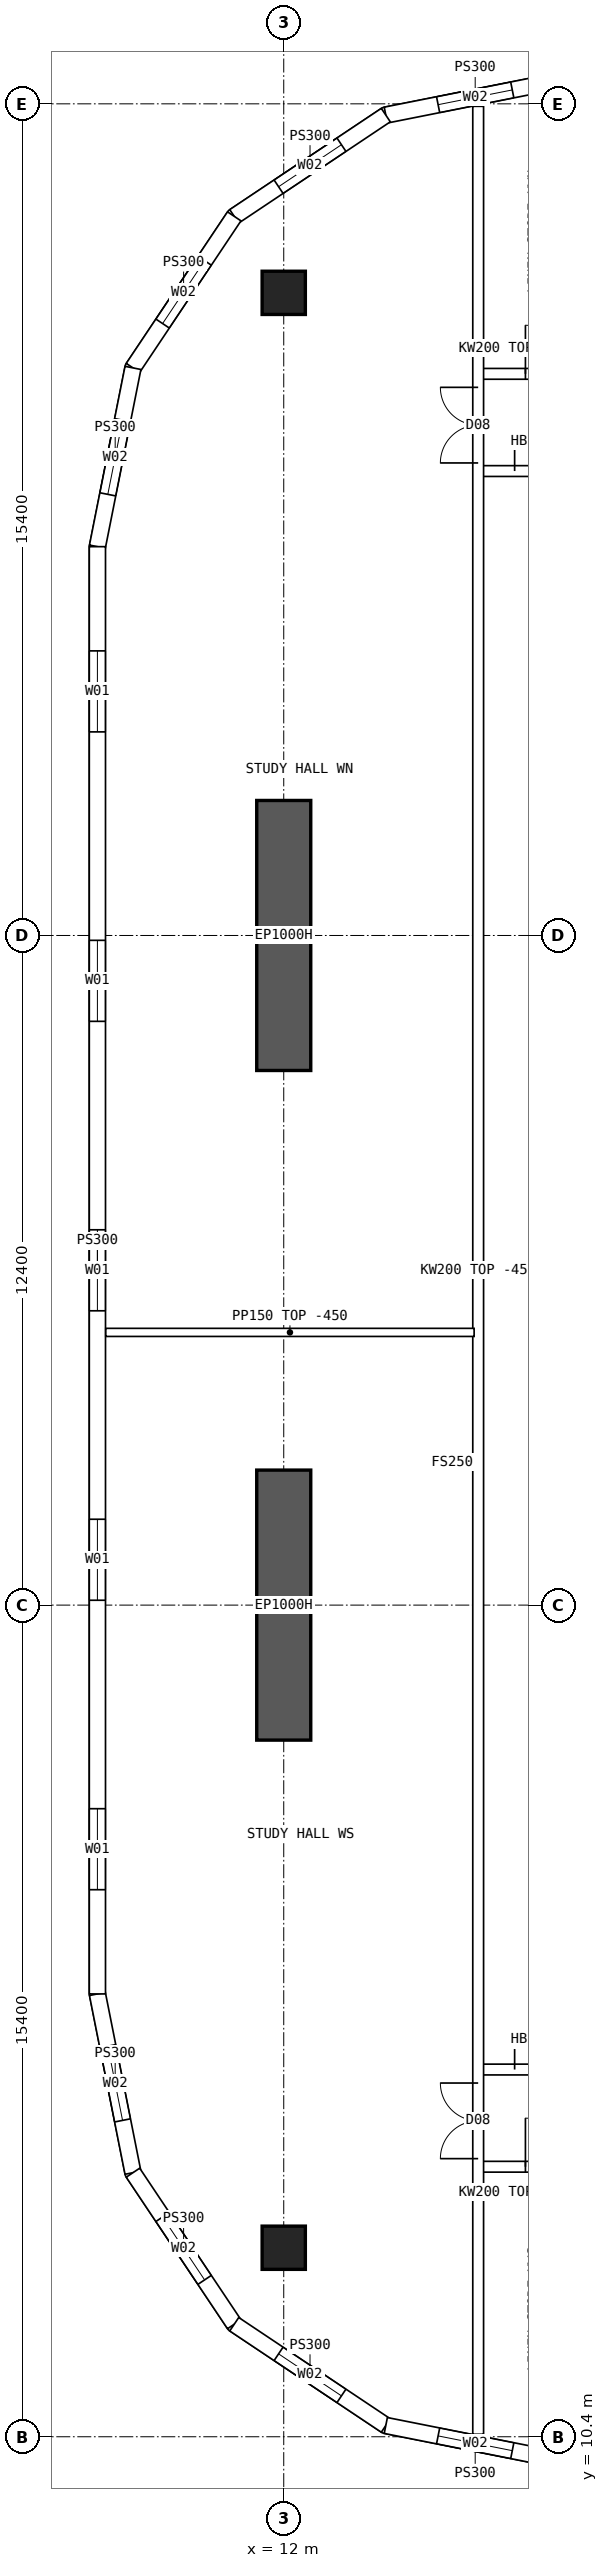
"""IFC4 building model, lengths in metres.
Left out: names, types, materials, properties, quantities, classifications, styles, units other than length and angle.
Written with IfcOpenShell. Run it as: python <this file> out.ifc"""

import sys

from ifc_helpers import new_model, si_unit, direction, frame, frame_2d, origin, origin_2d, place, context, subcontext, project, spatial, polyline, rectangle, hollow_rectangle, outline, extrude, element, fill, save


model = new_model("IFC4")
c1 = context("Model", 3, precision=1e-05, world=origin(), true_north=direction((0.0, 1.0)))
c2 = subcontext(c1, "Body", "Model", "MODEL_VIEW")
j1 = project(units=[si_unit("LENGTHUNIT", "METRE"), si_unit("PLANEANGLEUNIT", "RADIAN")], contexts=[c1])
p1 = place(None, origin())
s1 = spatial("IfcSite", under=j1, at=p1, CompositionType="ELEMENT")
p2 = place(p1, origin())
s2 = spatial("IfcBuilding", under=s1, at=p2, CompositionType="ELEMENT")
p3 = place(p2, frame((0.0, 0.0, 144.85)))
s3 = spatial("IfcBuildingStorey", under=s2, at=p3, CompositionType="ELEMENT", Elevation=144.85)
for number, where, z_axis, x_axis in (
    (1, (12.0, 13.9, 0.0), (0.0, 0.0, 1.0), (1.0, 0.0, 0.0)),
    (2, (12.0, 50.1, 0.0), (0.0, 0.0, 1.0), (1.0, 0.0, 0.0)),
):
    element("IfcColumn", number, at=place(p3, frame(where, z_axis=z_axis, x_axis=x_axis)), inside=s3, PredefinedType="COLUMN", context=c2, shape_type="SweptSolid", body=[
        extrude(hollow_rectangle(XDim=0.8, YDim=0.8, WallThickness=0.08, at=origin_2d()), origin(), (0.0, 0.0, 1.0), 3.75),
    ])
for number, where, z_axis, x_axis in (
    (3, (12.0, 23.3, 0.0), (0.0, 0.0, 1.0), (0.0, 1.0, 0.0)),
    (4, (12.0, 35.7, 0.0), (0.0, 0.0, 1.0), (0.0, 1.0, 0.0)),
):
    element("IfcWall", number, at=place(p3, frame(where, z_axis=z_axis, x_axis=x_axis)), inside=s3, PredefinedType="SHEAR", context=c2, shape_type="SweptSolid", body=[
        extrude(rectangle(XDim=5.0, YDim=1.0, at=frame_2d((2.5, 0.0))), origin(), (0.0, 0.0, 1.0), 3.75),
    ])
p4 = place(p3, frame((8.55, 45.4, 0.0), z_axis=(0.0, 0.0, 1.0), x_axis=(0.0, -1.0, 0.0)))
e5 = element("IfcWall", 5, at=p4, inside=s3, PredefinedType="SOLIDWALL", context=c2, shape_type="SweptSolid", body=[
    extrude(outline(polyline([(-0.015, -0.15), (26.815, -0.15), (26.785, 0.15), (0.015, 0.15), (-0.015, -0.15)])), origin(), (0.0, 0.0, 1.0), 3.3),
])
p5 = place(p4, frame((1.93, 0.0, 0.9)))
e6 = element("IfcOpeningElement", 6, at=p5, cuts=e5, PredefinedType="OPENING", context=c2, shape_type="SweptSolid", body=[
    extrude(rectangle(XDim=1.5, YDim=2.0, at=frame_2d((0.75, 1.0))), frame((0.0, 0.16, 0.0), z_axis=(0.0, -1.0, 0.0), x_axis=(1.0, 0.0, 0.0)), (0.0, 0.0, 1.0), 0.32),
])
p6 = place(p4, frame((7.29, 0.0, 0.9)))
e7 = element("IfcOpeningElement", 7, at=p6, cuts=e5, PredefinedType="OPENING", context=c2, shape_type="SweptSolid", body=[
    extrude(rectangle(XDim=1.5, YDim=2.0, at=frame_2d((0.75, 1.0))), frame((0.0, 0.16, 0.0), z_axis=(0.0, -1.0, 0.0), x_axis=(1.0, 0.0, 0.0)), (0.0, 0.0, 1.0), 0.32),
])
p7 = place(p4, frame((12.65, 0.0, 0.9)))
e8 = element("IfcOpeningElement", 8, at=p7, cuts=e5, PredefinedType="OPENING", context=c2, shape_type="SweptSolid", body=[
    extrude(rectangle(XDim=1.5, YDim=2.0, at=frame_2d((0.75, 1.0))), frame((0.0, 0.16, 0.0), z_axis=(0.0, -1.0, 0.0), x_axis=(1.0, 0.0, 0.0)), (0.0, 0.0, 1.0), 0.32),
])
p8 = place(p4, frame((18.01, 0.0, 0.9)))
e9 = element("IfcOpeningElement", 9, at=p8, cuts=e5, PredefinedType="OPENING", context=c2, shape_type="SweptSolid", body=[
    extrude(rectangle(XDim=1.5, YDim=2.0, at=frame_2d((0.75, 1.0))), frame((0.0, 0.16, 0.0), z_axis=(0.0, -1.0, 0.0), x_axis=(1.0, 0.0, 0.0)), (0.0, 0.0, 1.0), 0.32),
])
p9 = place(p4, frame((23.37, 0.0, 0.9)))
e10 = element("IfcOpeningElement", 10, at=p9, cuts=e5, PredefinedType="OPENING", context=c2, shape_type="SweptSolid", body=[
    extrude(rectangle(XDim=1.5, YDim=2.0, at=frame_2d((0.75, 1.0))), frame((0.0, 0.16, 0.0), z_axis=(0.0, -1.0, 0.0), x_axis=(1.0, 0.0, 0.0)), (0.0, 0.0, 1.0), 0.32),
])
p10 = place(p3, frame((17.2, 54.05, 0.0), z_axis=(0.0, 0.0, 1.0), x_axis=(-0.98078325777, -0.195100490205, 0.0)))
e11 = element("IfcWall", 11, at=p10, inside=s3, PredefinedType="SOLIDWALL", context=c2, shape_type="SweptSolid", body=[
    extrude(outline(polyline([(-0.03, -0.15), (3.405, -0.15), (3.345, 0.15), (0.03, 0.15), (-0.03, -0.15)])), origin(), (0.0, 0.0, 1.0), 3.3),
])
p11 = place(p10, frame((0.988, 0.0, 0.9)))
e12 = element("IfcOpeningElement", 12, at=p11, cuts=e11, PredefinedType="OPENING", context=c2, shape_type="SweptSolid", body=[
    extrude(rectangle(XDim=1.4, YDim=1.8, at=frame_2d((0.7, 0.9))), frame((0.0, 0.16, 0.0), z_axis=(0.0, -1.0, 0.0), x_axis=(1.0, 0.0, 0.0)), (0.0, 0.0, 1.0), 0.32),
])
p12 = place(p3, frame((13.89, 53.392, 0.0), z_axis=(0.0, 0.0, 1.0), x_axis=(-0.831493450887, -0.555534554399, 0.0)))
e13 = element("IfcWall", 13, at=p12, inside=s3, PredefinedType="SOLIDWALL", context=c2, shape_type="SweptSolid", body=[
    extrude(outline(polyline([(-0.03, -0.15), (3.405, -0.15), (3.345, 0.15), (0.03, 0.15), (-0.03, -0.15)])), origin(), (0.0, 0.0, 1.0), 3.3),
])
p13 = place(p12, frame((0.988, 0.0, 0.9)))
e14 = element("IfcOpeningElement", 14, at=p13, cuts=e13, PredefinedType="OPENING", context=c2, shape_type="SweptSolid", body=[
    extrude(rectangle(XDim=1.4, YDim=1.8, at=frame_2d((0.7, 0.9))), frame((0.0, 0.16, 0.0), z_axis=(0.0, -1.0, 0.0), x_axis=(1.0, 0.0, 0.0)), (0.0, 0.0, 1.0), 0.32),
])
p14 = place(p3, frame((11.083, 51.517, 0.0), z_axis=(0.0, 0.0, 1.0), x_axis=(-0.555534554399, -0.831493450887, 0.0)))
e15 = element("IfcWall", 15, at=p14, inside=s3, PredefinedType="SOLIDWALL", context=c2, shape_type="SweptSolid", body=[
    extrude(outline(polyline([(-0.03, -0.15), (3.405, -0.15), (3.345, 0.15), (0.03, 0.15), (-0.03, -0.15)])), origin(), (0.0, 0.0, 1.0), 3.3),
])
p15 = place(p14, frame((0.988, 0.0, 0.9)))
e16 = element("IfcOpeningElement", 16, at=p15, cuts=e15, PredefinedType="OPENING", context=c2, shape_type="SweptSolid", body=[
    extrude(rectangle(XDim=1.4, YDim=1.8, at=frame_2d((0.7, 0.9))), frame((0.0, 0.16, 0.0), z_axis=(0.0, -1.0, 0.0), x_axis=(1.0, 0.0, 0.0)), (0.0, 0.0, 1.0), 0.32),
])
p16 = place(p3, frame((9.208, 48.71, 0.0), z_axis=(0.0, 0.0, 1.0), x_axis=(-0.19508664885, -0.980786011034, 0.0)))
e17 = element("IfcWall", 17, at=p16, inside=s3, PredefinedType="SOLIDWALL", context=c2, shape_type="SweptSolid", body=[
    extrude(outline(polyline([(-0.03, -0.15), (3.39, -0.15), (3.36, 0.15), (0.03, 0.15), (-0.03, -0.15)])), origin(), (0.0, 0.0, 1.0), 3.3),
])
p17 = place(p16, frame((0.988, 0.0, 0.9)))
e18 = element("IfcOpeningElement", 18, at=p17, cuts=e17, PredefinedType="OPENING", context=c2, shape_type="SweptSolid", body=[
    extrude(rectangle(XDim=1.4, YDim=1.8, at=frame_2d((0.7, 0.9))), frame((0.0, 0.16, 0.0), z_axis=(0.0, -1.0, 0.0), x_axis=(1.0, 0.0, 0.0)), (0.0, 0.0, 1.0), 0.32),
])
p18 = place(p3, frame((8.55, 18.6, 0.0), z_axis=(0.0, 0.0, 1.0), x_axis=(0.19508664885, -0.980786011034, 0.0)))
e19 = element("IfcWall", 19, at=p18, inside=s3, PredefinedType="SOLIDWALL", context=c2, shape_type="SweptSolid", body=[
    extrude(outline(polyline([(-0.015, -0.15), (3.405, -0.15), (3.345, 0.15), (0.015, 0.15), (-0.015, -0.15)])), origin(), (0.0, 0.0, 1.0), 3.3),
])
p19 = place(p18, frame((0.988, 0.0, 0.9)))
e20 = element("IfcOpeningElement", 20, at=p19, cuts=e19, PredefinedType="OPENING", context=c2, shape_type="SweptSolid", body=[
    extrude(rectangle(XDim=1.4, YDim=1.8, at=frame_2d((0.7, 0.9))), frame((0.0, 0.16, 0.0), z_axis=(0.0, -1.0, 0.0), x_axis=(1.0, 0.0, 0.0)), (0.0, 0.0, 1.0), 0.32),
])
p20 = place(p3, frame((9.208, 15.29, 0.0), z_axis=(0.0, 0.0, 1.0), x_axis=(0.555534554399, -0.831493450887, 0.0)))
e21 = element("IfcWall", 21, at=p20, inside=s3, PredefinedType="SOLIDWALL", context=c2, shape_type="SweptSolid", body=[
    extrude(outline(polyline([(-0.03, -0.15), (3.405, -0.15), (3.345, 0.15), (0.03, 0.15), (-0.03, -0.15)])), origin(), (0.0, 0.0, 1.0), 3.3),
])
p21 = place(p20, frame((0.988, 0.0, 0.9)))
e22 = element("IfcOpeningElement", 22, at=p21, cuts=e21, PredefinedType="OPENING", context=c2, shape_type="SweptSolid", body=[
    extrude(rectangle(XDim=1.4, YDim=1.8, at=frame_2d((0.7, 0.9))), frame((0.0, 0.16, 0.0), z_axis=(0.0, -1.0, 0.0), x_axis=(1.0, 0.0, 0.0)), (0.0, 0.0, 1.0), 0.32),
])
p22 = place(p3, frame((11.083, 12.483, 0.0), z_axis=(0.0, 0.0, 1.0), x_axis=(0.831493450887, -0.555534554399, 0.0)))
e23 = element("IfcWall", 23, at=p22, inside=s3, PredefinedType="SOLIDWALL", context=c2, shape_type="SweptSolid", body=[
    extrude(outline(polyline([(-0.03, -0.15), (3.405, -0.15), (3.345, 0.15), (0.03, 0.15), (-0.03, -0.15)])), origin(), (0.0, 0.0, 1.0), 3.3),
])
p23 = place(p22, frame((0.988, 0.0, 0.9)))
e24 = element("IfcOpeningElement", 24, at=p23, cuts=e23, PredefinedType="OPENING", context=c2, shape_type="SweptSolid", body=[
    extrude(rectangle(XDim=1.4, YDim=1.8, at=frame_2d((0.7, 0.9))), frame((0.0, 0.16, 0.0), z_axis=(0.0, -1.0, 0.0), x_axis=(1.0, 0.0, 0.0)), (0.0, 0.0, 1.0), 0.32),
])
p24 = place(p3, frame((13.89, 10.608, 0.0), z_axis=(0.0, 0.0, 1.0), x_axis=(0.98078325777, -0.195100490205, 0.0)))
e25 = element("IfcWall", 25, at=p24, inside=s3, PredefinedType="SOLIDWALL", context=c2, shape_type="SweptSolid", body=[
    extrude(outline(polyline([(-0.03, -0.15), (3.405, -0.15), (3.345, 0.15), (0.03, 0.15), (-0.03, -0.15)])), origin(), (0.0, 0.0, 1.0), 3.3),
])
p25 = place(p24, frame((0.988, 0.0, 0.9)))
e26 = element("IfcOpeningElement", 26, at=p25, cuts=e25, PredefinedType="OPENING", context=c2, shape_type="SweptSolid", body=[
    extrude(rectangle(XDim=1.4, YDim=1.8, at=frame_2d((0.7, 0.9))), frame((0.0, 0.16, 0.0), z_axis=(0.0, -1.0, 0.0), x_axis=(1.0, 0.0, 0.0)), (0.0, 0.0, 1.0), 0.32),
])
p26 = place(p3, frame((15.6, 15.4, 0.0), z_axis=(0.0, 0.0, 1.0), x_axis=(1.0, 0.0, 0.0)))
e27 = element("IfcWall", 27, at=p26, inside=s3, PredefinedType="SOLIDWALL", context=c2, shape_type="SweptSolid", body=[
    extrude(rectangle(XDim=1.975, YDim=0.2, at=frame_2d((0.987, 0.0))), origin(), (0.0, 0.0, 1.0), 3.3),
])
p27 = place(p26, frame((0.875, 0.0, 0.0)))
e28 = element("IfcOpeningElement", 28, at=p27, cuts=e27, PredefinedType="OPENING", context=c2, shape_type="SweptSolid", body=[
    extrude(rectangle(XDim=0.9, YDim=2.1, at=frame_2d((0.45, 1.05))), frame((0.0, 0.11, 0.0), z_axis=(0.0, -1.0, 0.0), x_axis=(1.0, 0.0, 0.0)), (0.0, 0.0, 1.0), 0.22),
])
p28 = place(p3, frame((15.6, 17.2, 0.0), z_axis=(0.0, 0.0, 1.0), x_axis=(1.0, 0.0, 0.0)))
e29 = element("IfcWall", 29, at=p28, inside=s3, PredefinedType="SOLIDWALL", context=c2, shape_type="SweptSolid", body=[
    extrude(rectangle(XDim=1.975, YDim=0.2, at=frame_2d((0.987, 0.0))), origin(), (0.0, 0.0, 1.0), 3.3),
])
p29 = place(p28, frame((0.675, 0.0, 0.0)))
e30 = element("IfcOpeningElement", 30, at=p29, cuts=e29, PredefinedType="OPENING", context=c2, shape_type="SweptSolid", body=[
    extrude(rectangle(XDim=1.2, YDim=2.1, at=frame_2d((0.6, 1.05))), frame((0.0, 0.11, 0.0), z_axis=(0.0, -1.0, 0.0), x_axis=(1.0, 0.0, 0.0)), (0.0, 0.0, 1.0), 0.22),
])
p30 = place(p3, frame((15.6, 48.6, 0.0), z_axis=(0.0, 0.0, 1.0), x_axis=(1.0, 0.0, 0.0)))
e31 = element("IfcWall", 31, at=p30, inside=s3, PredefinedType="SOLIDWALL", context=c2, shape_type="SweptSolid", body=[
    extrude(rectangle(XDim=1.975, YDim=0.2, at=frame_2d((0.987, 0.0))), origin(), (0.0, 0.0, 1.0), 3.3),
])
p31 = place(p30, frame((0.875, 0.0, 0.0)))
e32 = element("IfcOpeningElement", 32, at=p31, cuts=e31, PredefinedType="OPENING", context=c2, shape_type="SweptSolid", body=[
    extrude(rectangle(XDim=0.9, YDim=2.1, at=frame_2d((0.45, 1.05))), frame((0.0, 0.11, 0.0), z_axis=(0.0, -1.0, 0.0), x_axis=(1.0, 0.0, 0.0)), (0.0, 0.0, 1.0), 0.22),
])
p32 = place(p3, frame((15.6, 46.8, 0.0), z_axis=(0.0, 0.0, 1.0), x_axis=(1.0, 0.0, 0.0)))
e33 = element("IfcWall", 33, at=p32, inside=s3, PredefinedType="SOLIDWALL", context=c2, shape_type="SweptSolid", body=[
    extrude(rectangle(XDim=1.975, YDim=0.2, at=frame_2d((0.987, 0.0))), origin(), (0.0, 0.0, 1.0), 3.3),
])
p33 = place(p32, frame((0.675, 0.0, 0.0)))
e34 = element("IfcOpeningElement", 34, at=p33, cuts=e33, PredefinedType="OPENING", context=c2, shape_type="SweptSolid", body=[
    extrude(rectangle(XDim=1.2, YDim=2.1, at=frame_2d((0.6, 1.05))), frame((0.0, 0.11, 0.0), z_axis=(0.0, -1.0, 0.0), x_axis=(1.0, 0.0, 0.0)), (0.0, 0.0, 1.0), 0.22),
])
p34 = place(p3, frame((8.705, 30.85, 0.0), z_axis=(0.0, 0.0, 1.0), x_axis=(1.0, 0.0, 0.0)))
e35 = element("IfcWall", 35, at=p34, inside=s3, PredefinedType="PARTITIONING", context=c2, shape_type="SweptSolid", body=[
    extrude(outline(polyline([(0.0, 0.0), (6.82, 0.0), (6.82, 3.3), (3.597, 3.3), (3.595, 2.85), (2.997, 2.85), (2.995, 3.3), (0.0, 3.3), (0.0, 0.0)])), frame((0.0, 0.075, 0.0), z_axis=(0.0, -1.0, 0.0), x_axis=(1.0, 0.0, 0.0)), (0.0, 0.0, 1.0), 0.15),
])
p35 = place(p3, frame((15.6, 10.446, 0.0), z_axis=(0.0, 0.0, 1.0), x_axis=(0.0, 1.0, 0.0)))
e36 = element("IfcWall", 36, at=p35, inside=s3, PredefinedType="SOLIDWALL", context=c2, shape_type="SweptSolid", body=[
    extrude(rectangle(XDim=43.107, YDim=0.2, at=frame_2d((21.554, 0.0))), origin(), (0.0, 0.0, 1.0), 3.3),
])
p36 = place(p35, frame((5.104, 0.0, 0.0)))
e37 = element("IfcOpeningElement", 37, at=p36, cuts=e36, PredefinedType="OPENING", context=c2, shape_type="SweptSolid", body=[
    extrude(rectangle(XDim=1.4, YDim=2.1, at=frame_2d((0.7, 1.05))), frame((0.0, 0.11, 0.0), z_axis=(0.0, -1.0, 0.0), x_axis=(1.0, 0.0, 0.0)), (0.0, 0.0, 1.0), 0.22),
])
p37 = place(p35, frame((36.504, 0.0, 0.0)))
e38 = element("IfcOpeningElement", 38, at=p37, cuts=e36, PredefinedType="OPENING", context=c2, shape_type="SweptSolid", body=[
    extrude(rectangle(XDim=1.4, YDim=2.1, at=frame_2d((0.7, 1.05))), frame((0.0, 0.11, 0.0), z_axis=(0.0, -1.0, 0.0), x_axis=(1.0, 0.0, 0.0)), (0.0, 0.0, 1.0), 0.22),
])
p38 = place(p5, origin())
e39 = element("IfcWindow", 39, at=p38, inside=s3, PartitioningType="SINGLE_PANEL", PredefinedType="WINDOW", context=c2, shape_type="SweptSolid", body=[
    extrude(rectangle(XDim=1.5, YDim=2.0, at=frame_2d((0.75, 1.0))), frame((0.0, 0.03, 0.0), z_axis=(0.0, -1.0, 0.0), x_axis=(1.0, 0.0, 0.0)), (0.0, 0.0, 1.0), 0.06),
])
fill(e6, e39)
p39 = place(p6, origin())
e40 = element("IfcWindow", 40, at=p39, inside=s3, PartitioningType="SINGLE_PANEL", PredefinedType="WINDOW", context=c2, shape_type="SweptSolid", body=[
    extrude(rectangle(XDim=1.5, YDim=2.0, at=frame_2d((0.75, 1.0))), frame((0.0, 0.03, 0.0), z_axis=(0.0, -1.0, 0.0), x_axis=(1.0, 0.0, 0.0)), (0.0, 0.0, 1.0), 0.06),
])
fill(e7, e40)
p40 = place(p7, origin())
e41 = element("IfcWindow", 41, at=p40, inside=s3, PartitioningType="SINGLE_PANEL", PredefinedType="WINDOW", context=c2, shape_type="SweptSolid", body=[
    extrude(rectangle(XDim=1.5, YDim=2.0, at=frame_2d((0.75, 1.0))), frame((0.0, 0.03, 0.0), z_axis=(0.0, -1.0, 0.0), x_axis=(1.0, 0.0, 0.0)), (0.0, 0.0, 1.0), 0.06),
])
fill(e8, e41)
p41 = place(p8, origin())
e42 = element("IfcWindow", 42, at=p41, inside=s3, PartitioningType="SINGLE_PANEL", PredefinedType="WINDOW", context=c2, shape_type="SweptSolid", body=[
    extrude(rectangle(XDim=1.5, YDim=2.0, at=frame_2d((0.75, 1.0))), frame((0.0, 0.03, 0.0), z_axis=(0.0, -1.0, 0.0), x_axis=(1.0, 0.0, 0.0)), (0.0, 0.0, 1.0), 0.06),
])
fill(e9, e42)
p42 = place(p9, origin())
e43 = element("IfcWindow", 43, at=p42, inside=s3, PartitioningType="SINGLE_PANEL", PredefinedType="WINDOW", context=c2, shape_type="SweptSolid", body=[
    extrude(rectangle(XDim=1.5, YDim=2.0, at=frame_2d((0.75, 1.0))), frame((0.0, 0.03, 0.0), z_axis=(0.0, -1.0, 0.0), x_axis=(1.0, 0.0, 0.0)), (0.0, 0.0, 1.0), 0.06),
])
fill(e10, e43)
p43 = place(p11, origin())
e44 = element("IfcWindow", 44, at=p43, inside=s3, PartitioningType="SINGLE_PANEL", PredefinedType="WINDOW", context=c2, shape_type="SweptSolid", body=[
    extrude(rectangle(XDim=1.4, YDim=1.8, at=frame_2d((0.7, 0.9))), frame((0.0, 0.03, 0.0), z_axis=(0.0, -1.0, 0.0), x_axis=(1.0, 0.0, 0.0)), (0.0, 0.0, 1.0), 0.06),
])
fill(e12, e44)
p44 = place(p13, origin())
e45 = element("IfcWindow", 45, at=p44, inside=s3, PartitioningType="SINGLE_PANEL", PredefinedType="WINDOW", context=c2, shape_type="SweptSolid", body=[
    extrude(rectangle(XDim=1.4, YDim=1.8, at=frame_2d((0.7, 0.9))), frame((0.0, 0.03, 0.0), z_axis=(0.0, -1.0, 0.0), x_axis=(1.0, 0.0, 0.0)), (0.0, 0.0, 1.0), 0.06),
])
fill(e14, e45)
p45 = place(p15, origin())
e46 = element("IfcWindow", 46, at=p45, inside=s3, PartitioningType="SINGLE_PANEL", PredefinedType="WINDOW", context=c2, shape_type="SweptSolid", body=[
    extrude(rectangle(XDim=1.4, YDim=1.8, at=frame_2d((0.7, 0.9))), frame((0.0, 0.03, 0.0), z_axis=(0.0, -1.0, 0.0), x_axis=(1.0, 0.0, 0.0)), (0.0, 0.0, 1.0), 0.06),
])
fill(e16, e46)
p46 = place(p17, origin())
e47 = element("IfcWindow", 47, at=p46, inside=s3, PartitioningType="SINGLE_PANEL", PredefinedType="WINDOW", context=c2, shape_type="SweptSolid", body=[
    extrude(rectangle(XDim=1.4, YDim=1.8, at=frame_2d((0.7, 0.9))), frame((0.0, 0.03, 0.0), z_axis=(0.0, -1.0, 0.0), x_axis=(1.0, 0.0, 0.0)), (0.0, 0.0, 1.0), 0.06),
])
fill(e18, e47)
p47 = place(p19, origin())
e48 = element("IfcWindow", 48, at=p47, inside=s3, PartitioningType="SINGLE_PANEL", PredefinedType="WINDOW", context=c2, shape_type="SweptSolid", body=[
    extrude(rectangle(XDim=1.4, YDim=1.8, at=frame_2d((0.7, 0.9))), frame((0.0, 0.03, 0.0), z_axis=(0.0, -1.0, 0.0), x_axis=(1.0, 0.0, 0.0)), (0.0, 0.0, 1.0), 0.06),
])
fill(e20, e48)
p48 = place(p21, origin())
e49 = element("IfcWindow", 49, at=p48, inside=s3, PartitioningType="SINGLE_PANEL", PredefinedType="WINDOW", context=c2, shape_type="SweptSolid", body=[
    extrude(rectangle(XDim=1.4, YDim=1.8, at=frame_2d((0.7, 0.9))), frame((0.0, 0.03, 0.0), z_axis=(0.0, -1.0, 0.0), x_axis=(1.0, 0.0, 0.0)), (0.0, 0.0, 1.0), 0.06),
])
fill(e22, e49)
p49 = place(p23, origin())
e50 = element("IfcWindow", 50, at=p49, inside=s3, PartitioningType="SINGLE_PANEL", PredefinedType="WINDOW", context=c2, shape_type="SweptSolid", body=[
    extrude(rectangle(XDim=1.4, YDim=1.8, at=frame_2d((0.7, 0.9))), frame((0.0, 0.03, 0.0), z_axis=(0.0, -1.0, 0.0), x_axis=(1.0, 0.0, 0.0)), (0.0, 0.0, 1.0), 0.06),
])
fill(e24, e50)
p50 = place(p25, origin())
e51 = element("IfcWindow", 51, at=p50, inside=s3, PartitioningType="SINGLE_PANEL", PredefinedType="WINDOW", context=c2, shape_type="SweptSolid", body=[
    extrude(rectangle(XDim=1.4, YDim=1.8, at=frame_2d((0.7, 0.9))), frame((0.0, 0.03, 0.0), z_axis=(0.0, -1.0, 0.0), x_axis=(1.0, 0.0, 0.0)), (0.0, 0.0, 1.0), 0.06),
])
fill(e26, e51)
p51 = place(p29, origin())
e52 = element("IfcDoor", 52, at=p51, inside=s3, OperationType="DOUBLE_DOOR_SINGLE_SWING", PredefinedType="DOOR", context=c2, shape_type="SweptSolid", body=[
    extrude(rectangle(XDim=1.2, YDim=2.1, at=frame_2d((0.6, 1.05))), frame((0.0, 0.025, 0.0), z_axis=(0.0, -1.0, 0.0), x_axis=(1.0, 0.0, 0.0)), (0.0, 0.0, 1.0), 0.05),
])
fill(e30, e52)
p52 = place(p33, origin())
e53 = element("IfcDoor", 53, at=p52, inside=s3, OperationType="DOUBLE_DOOR_SINGLE_SWING", PredefinedType="DOOR", context=c2, shape_type="SweptSolid", body=[
    extrude(rectangle(XDim=1.2, YDim=2.1, at=frame_2d((0.6, 1.05))), frame((0.0, 0.025, 0.0), z_axis=(0.0, -1.0, 0.0), x_axis=(1.0, 0.0, 0.0)), (0.0, 0.0, 1.0), 0.05),
])
fill(e34, e53)
p53 = place(p36, origin())
e54 = element("IfcDoor", 54, at=p53, inside=s3, OperationType="DOUBLE_DOOR_SINGLE_SWING", PredefinedType="DOOR", context=c2, shape_type="SweptSolid", body=[
    extrude(rectangle(XDim=1.4, YDim=2.1, at=frame_2d((0.7, 1.05))), frame((0.0, 0.025, 0.0), z_axis=(0.0, -1.0, 0.0), x_axis=(1.0, 0.0, 0.0)), (0.0, 0.0, 1.0), 0.05),
])
fill(e37, e54)
p54 = place(p37, origin())
e55 = element("IfcDoor", 55, at=p54, inside=s3, OperationType="DOUBLE_DOOR_SINGLE_SWING", PredefinedType="DOOR", context=c2, shape_type="SweptSolid", body=[
    extrude(rectangle(XDim=1.4, YDim=2.1, at=frame_2d((0.7, 1.05))), frame((0.0, 0.025, 0.0), z_axis=(0.0, -1.0, 0.0), x_axis=(1.0, 0.0, 0.0)), (0.0, 0.0, 1.0), 0.05),
])
fill(e38, e55)
p55 = place(p27, origin())
e56 = element("IfcDoor", 56, at=p55, inside=s3, OperationType="SINGLE_SWING_LEFT", PredefinedType="DOOR", context=c2, shape_type="SweptSolid", body=[
    extrude(rectangle(XDim=0.9, YDim=2.1, at=frame_2d((0.45, 1.05))), frame((0.0, 0.025, 0.0), z_axis=(0.0, -1.0, 0.0), x_axis=(1.0, 0.0, 0.0)), (0.0, 0.0, 1.0), 0.05),
])
fill(e28, e56)
p56 = place(p31, origin())
e57 = element("IfcDoor", 57, at=p56, inside=s3, OperationType="SINGLE_SWING_LEFT", PredefinedType="DOOR", context=c2, shape_type="SweptSolid", body=[
    extrude(rectangle(XDim=0.9, YDim=2.1, at=frame_2d((0.45, 1.05))), frame((0.0, 0.025, 0.0), z_axis=(0.0, -1.0, 0.0), x_axis=(1.0, 0.0, 0.0)), (0.0, 0.0, 1.0), 0.05),
])
fill(e32, e57)
save(model, sys.argv[1])
